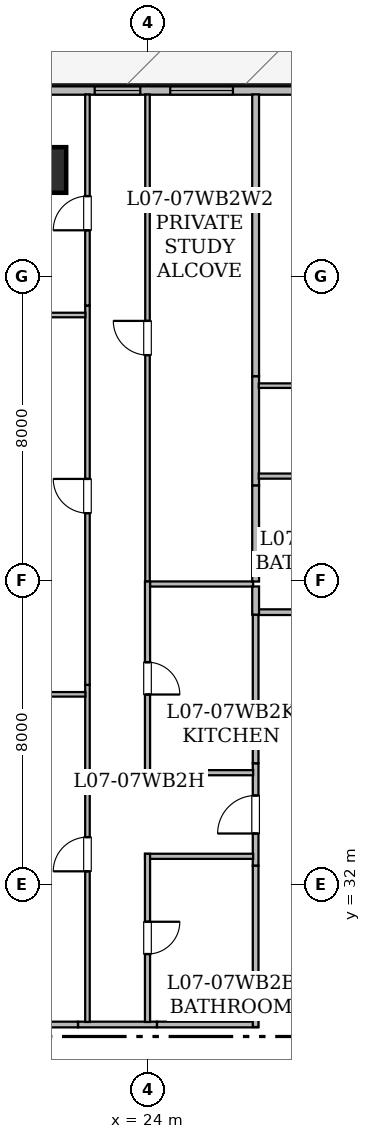
"""IFC4 building model, lengths in metres.
Left out: names, types, materials, properties, quantities, classifications, styles, units other than length and angle.
Written with IfcOpenShell. Run it as: python <this file> out.ifc"""

import sys

from ifc_helpers import new_model, si_unit, direction, frame, frame_2d, origin, origin_2d, place, context, subcontext, project, spatial, rectangle, hollow_rectangle, extrude, element, fill, save


model = new_model("IFC4")
c1 = context("Model", 3, precision=1e-05, world=origin(), true_north=direction((0.0, 1.0)))
c2 = subcontext(c1, "Body", "Model", "MODEL_VIEW")
j1 = project(units=[si_unit("LENGTHUNIT", "METRE"), si_unit("PLANEANGLEUNIT", "RADIAN")], contexts=[c1])
p1 = place(None, origin())
s1 = spatial("IfcSite", under=j1, at=p1, CompositionType="ELEMENT")
p2 = place(p1, origin())
s2 = spatial("IfcBuilding", under=s1, at=p2, CompositionType="ELEMENT")
p3 = place(p2, frame((0.0, 0.0, 33.3)))
s3 = spatial("IfcBuildingStorey", under=s2, at=p3, CompositionType="ELEMENT", Elevation=33.3)
p4 = place(p3, frame((21.25, 50.8, 0.025), z_axis=(0.0, 0.0, 1.0), x_axis=(1.0, 0.0, 0.0)))
e1 = element("IfcColumn", 1, at=p4, inside=s3, PredefinedType="COLUMN", context=c2, shape_type="SweptSolid", body=[
    extrude(hollow_rectangle(XDim=1.2, YDim=1.2, WallThickness=0.06, at=origin_2d()), origin(), (0.0, 0.0, 1.0), 3.625),
])
p5 = place(p3, frame((8.315, 52.89, 0.0), z_axis=(0.0, 0.0, 1.0), x_axis=(1.0, 0.0, 0.0)))
e2 = element("IfcWall", 2, at=p5, inside=s3, PredefinedType="STANDARD", context=c2, shape_type="SweptSolid", body=[
    extrude(rectangle(XDim=37.439, YDim=0.22, at=frame_2d((18.719, 0.0))), origin(), (0.0, 0.0, 1.0), 3.43),
])
p6 = place(p5, frame((19.779, 0.0, 0.0)))
e3 = element("IfcOpeningElement", 3, at=p6, cuts=e2, PredefinedType="OPENING", context=c2, shape_type="SweptSolid", body=[
    extrude(rectangle(XDim=1.0, YDim=2.15, at=frame_2d((0.5, 1.075))), frame((0.0, 0.12, 0.0), z_axis=(0.0, -1.0, 0.0), x_axis=(1.0, 0.0, 0.0)), (0.0, 0.0, 1.0), 0.24),
])
p7 = place(p5, frame((4.524, 0.0, 0.85)))
e4 = element("IfcOpeningElement", 4, at=p7, cuts=e2, PredefinedType="OPENING", context=c2, shape_type="SweptSolid", body=[
    extrude(rectangle(XDim=1.65, YDim=1.55, at=frame_2d((0.825, 0.775))), frame((0.0, 0.12, 0.0), z_axis=(0.0, -1.0, 0.0), x_axis=(1.0, 0.0, 0.0)), (0.0, 0.0, 1.0), 0.24),
])
p8 = place(p5, frame((16.273, 0.0, 0.85)))
e5 = element("IfcOpeningElement", 5, at=p8, cuts=e2, PredefinedType="OPENING", context=c2, shape_type="SweptSolid", body=[
    extrude(rectangle(XDim=1.65, YDim=1.55, at=frame_2d((0.825, 0.775))), frame((0.0, 0.12, 0.0), z_axis=(0.0, -1.0, 0.0), x_axis=(1.0, 0.0, 0.0)), (0.0, 0.0, 1.0), 0.24),
])
p9 = place(p5, frame((14.285, 0.0, 0.8)))
e6 = element("IfcOpeningElement", 6, at=p9, cuts=e2, PredefinedType="OPENING", context=c2, shape_type="SweptSolid", body=[
    extrude(rectangle(XDim=1.2, YDim=1.5, at=frame_2d((0.6, 0.75))), frame((0.0, 0.12, 0.0), z_axis=(0.0, -1.0, 0.0), x_axis=(1.0, 0.0, 0.0)), (0.0, 0.0, 1.0), 0.24),
])
p10 = place(p5, frame((10.238, 0.0, 0.85)))
e7 = element("IfcOpeningElement", 7, at=p10, cuts=e2, PredefinedType="OPENING", context=c2, shape_type="SweptSolid", body=[
    extrude(rectangle(XDim=1.65, YDim=1.55, at=frame_2d((0.825, 0.775))), frame((0.0, 0.12, 0.0), z_axis=(0.0, -1.0, 0.0), x_axis=(1.0, 0.0, 0.0)), (0.0, 0.0, 1.0), 0.24),
])
p11 = place(p5, frame((25.185, 0.0, 0.8)))
e8 = element("IfcOpeningElement", 8, at=p11, cuts=e2, PredefinedType="OPENING", context=c2, shape_type="SweptSolid", body=[
    extrude(rectangle(XDim=1.2, YDim=1.5, at=frame_2d((0.6, 0.75))), frame((0.0, 0.12, 0.0), z_axis=(0.0, -1.0, 0.0), x_axis=(1.0, 0.0, 0.0)), (0.0, 0.0, 1.0), 0.24),
])
p12 = place(p5, frame((28.985, 0.0, 0.85)))
e9 = element("IfcOpeningElement", 9, at=p12, cuts=e2, PredefinedType="OPENING", context=c2, shape_type="SweptSolid", body=[
    extrude(rectangle(XDim=1.65, YDim=1.55, at=frame_2d((0.825, 0.775))), frame((0.0, 0.12, 0.0), z_axis=(0.0, -1.0, 0.0), x_axis=(1.0, 0.0, 0.0)), (0.0, 0.0, 1.0), 0.24),
])
p13 = place(p5, frame((33.49, 0.0, 0.85)))
e10 = element("IfcOpeningElement", 10, at=p13, cuts=e2, PredefinedType="OPENING", context=c2, shape_type="SweptSolid", body=[
    extrude(rectangle(XDim=1.65, YDim=1.55, at=frame_2d((0.825, 0.775))), frame((0.0, 0.12, 0.0), z_axis=(0.0, -1.0, 0.0), x_axis=(1.0, 0.0, 0.0)), (0.0, 0.0, 1.0), 0.24),
])
p14 = place(p5, frame((35.942, 0.0, 0.85)))
e11 = element("IfcOpeningElement", 11, at=p14, cuts=e2, PredefinedType="OPENING", context=c2, shape_type="SweptSolid", body=[
    extrude(rectangle(XDim=1.35, YDim=1.5, at=frame_2d((0.675, 0.75))), frame((0.0, 0.12, 0.0), z_axis=(0.0, -1.0, 0.0), x_axis=(1.0, 0.0, 0.0)), (0.0, 0.0, 1.0), 0.24),
])
p15 = place(p3, frame((22.161, 28.315, 0.0), z_axis=(0.0, 0.0, 1.0), x_axis=(1.0, 0.0, 0.0)))
e12 = element("IfcWall", 12, at=p15, inside=s3, PredefinedType="STANDARD", context=c2, shape_type="SweptSolid", body=[
    extrude(rectangle(XDim=2.079, YDim=0.15, at=frame_2d((1.04, 0.0))), origin(), (0.0, 0.0, 1.0), 3.43),
])
p16 = place(p3, frame((26.835, 32.492, 0.0), z_axis=(0.0, 0.0, 1.0), x_axis=(0.0, 1.0, 0.0)))
e13 = element("IfcWall", 13, at=p16, inside=s3, PredefinedType="STANDARD", context=c2, shape_type="SweptSolid", body=[
    extrude(rectangle(XDim=2.698, YDim=0.15, at=frame_2d((1.349, 0.0))), origin(), (0.0, 0.0, 1.0), 3.43),
])
p17 = place(p16, frame((0.849, 0.0, 0.0)))
e14 = element("IfcOpeningElement", 14, at=p17, cuts=e13, PredefinedType="OPENING", context=c2, shape_type="SweptSolid", body=[
    extrude(rectangle(XDim=1.0, YDim=2.15, at=frame_2d((0.5, 1.075))), frame((0.0, 0.085, 0.0), z_axis=(0.0, -1.0, 0.0), x_axis=(1.0, 0.0, 0.0)), (0.0, 0.0, 1.0), 0.17),
])
p18 = place(p3, frame((24.24, 28.315, 0.0), z_axis=(0.0, 0.0, 1.0), x_axis=(1.0, 0.0, 0.0)))
e15 = element("IfcWall", 15, at=p18, inside=s3, PredefinedType="STANDARD", context=c2, shape_type="SweptSolid", body=[
    extrude(rectangle(XDim=2.66, YDim=0.15, at=frame_2d((1.33, 0.0))), origin(), (0.0, 0.0, 1.0), 3.43),
])
p19 = place(p3, frame((26.835, 28.25, 0.0), z_axis=(0.0, 0.0, 1.0), x_axis=(0.0, 1.0, 0.0)))
e16 = element("IfcWall", 16, at=p19, inside=s3, PredefinedType="STANDARD", context=c2, shape_type="SweptSolid", body=[
    extrude(rectangle(XDim=4.242, YDim=0.15, at=frame_2d((2.121, 0.0))), origin(), (0.0, 0.0, 1.0), 3.43),
])
p20 = place(p3, frame((26.835, 35.19, 0.0), z_axis=(0.0, 0.0, 1.0), x_axis=(0.0, 1.0, 0.0)))
e17 = element("IfcWall", 17, at=p20, inside=s3, PredefinedType="STANDARD", context=c2, shape_type="SweptSolid", body=[
    extrude(rectangle(XDim=3.91, YDim=0.15, at=frame_2d((1.955, 0.0))), origin(), (0.0, 0.0, 1.0), 2.647),
])
p21 = place(p3, frame((16.596, 28.315, 0.0), z_axis=(0.0, 0.0, 1.0), x_axis=(1.0, 0.0, 0.0)))
e18 = element("IfcWall", 18, at=p21, inside=s3, PredefinedType="STANDARD", context=c2, shape_type="SweptSolid", body=[
    extrude(rectangle(XDim=5.565, YDim=0.15, at=frame_2d((2.782, 0.0))), origin(), (0.0, 0.0, 1.0), 2.647),
])
p22 = place(p3, frame((26.9, 39.165, 0.0), z_axis=(0.0, 0.0, 1.0), x_axis=(1.0, 0.0, 0.0)))
e19 = element("IfcWall", 19, at=p22, inside=s3, PredefinedType="STANDARD", context=c2, shape_type="SweptSolid", body=[
    extrude(rectangle(XDim=4.701, YDim=0.15, at=frame_2d((2.351, 0.0))), origin(), (0.0, 0.0, 1.0), 2.647),
])
p23 = place(p3, frame((23.99, 39.971, 0.0), z_axis=(0.0, 0.0, 1.0), x_axis=(0.0, 1.0, 0.0)))
e20 = element("IfcWall", 20, at=p23, inside=s3, PredefinedType="PARTITIONING", context=c2, shape_type="SweptSolid", body=[
    extrude(rectangle(XDim=12.817, YDim=0.12, at=frame_2d((6.409, 0.0))), origin(), (0.0, 0.0, 1.0), 2.803),
])
p24 = place(p23, frame((5.958, 0.0, 0.0)))
e21 = element("IfcOpeningElement", 21, at=p24, cuts=e20, PredefinedType="OPENING", context=c2, shape_type="SweptSolid", body=[
    extrude(rectangle(XDim=0.9, YDim=2.1, at=frame_2d((0.45, 1.05))), frame((0.0, 0.07, 0.0), z_axis=(0.0, -1.0, 0.0), x_axis=(1.0, 0.0, 0.0)), (0.0, 0.0, 1.0), 0.14),
])
p25 = place(p3, frame((26.77, 39.906, 0.0), z_axis=(0.0, 0.0, 1.0), x_axis=(-1.0, 0.0, 0.0)))
e22 = element("IfcWall", 22, at=p25, inside=s3, PredefinedType="PARTITIONING", context=c2, shape_type="SweptSolid", body=[
    extrude(rectangle(XDim=2.715, YDim=0.135, at=frame_2d((1.357, 0.0))), origin(), (0.0, 0.0, 1.0), 3.43),
])
p26 = place(p3, frame((26.835, 45.374, 0.0), z_axis=(0.0, 0.0, 1.0), x_axis=(0.0, -1.0, 0.0)))
e23 = element("IfcWall", 23, at=p26, inside=s3, PredefinedType="STANDARD", context=c2, shape_type="SweptSolid", body=[
    extrude(rectangle(XDim=2.878, YDim=0.18, at=frame_2d((1.439, 0.0))), origin(), (0.0, 0.0, 1.0), 2.957),
])
p27 = place(p3, frame((26.835, 42.496, 0.0), z_axis=(0.0, 0.0, 1.0), x_axis=(0.0, -1.0, 0.0)))
e24 = element("IfcWall", 24, at=p27, inside=s3, PredefinedType="STANDARD", context=c2, shape_type="SweptSolid", body=[
    extrude(rectangle(XDim=2.525, YDim=0.18, at=frame_2d((1.263, 0.0))), origin(), (0.0, 0.0, 1.0), 2.957),
])
p28 = place(p3, frame((26.835, 52.788, 0.0), z_axis=(0.0, 0.0, 1.0), x_axis=(0.0, -1.0, 0.0)))
e25 = element("IfcWall", 25, at=p28, inside=s3, PredefinedType="STANDARD", context=c2, shape_type="SweptSolid", body=[
    extrude(rectangle(XDim=7.414, YDim=0.18, at=frame_2d((3.707, 0.0))), origin(), (0.0, 0.0, 1.0), 2.803),
])
p29 = place(p3, frame((26.77, 32.741, 0.0), z_axis=(0.0, 0.0, 1.0), x_axis=(-1.0, 0.0, 0.0)))
e26 = element("IfcWall", 26, at=p29, inside=s3, PredefinedType="PARTITIONING", context=c2, shape_type="SweptSolid", body=[
    extrude(rectangle(XDim=2.845, YDim=0.135, at=frame_2d((1.422, 0.0))), origin(), (0.0, 0.0, 1.0), 3.43),
])
p30 = place(p3, frame((23.99, 32.806, 0.0), z_axis=(0.0, 0.0, 1.0), x_axis=(0.0, -1.0, 0.0)))
e27 = element("IfcWall", 27, at=p30, inside=s3, PredefinedType="PARTITIONING", context=c2, shape_type="SweptSolid", body=[
    extrude(rectangle(XDim=4.424, YDim=0.135, at=frame_2d((2.212, 0.0))), origin(), (0.0, 0.0, 1.0), 3.43),
])
p31 = place(p30, frame((1.787, 0.0, 0.0)))
e28 = element("IfcOpeningElement", 28, at=p31, cuts=e27, PredefinedType="OPENING", context=c2, shape_type="SweptSolid", body=[
    extrude(rectangle(XDim=0.85, YDim=2.1, at=frame_2d((0.425, 1.05))), frame((0.0, 0.077, 0.0), z_axis=(0.0, -1.0, 0.0), x_axis=(1.0, 0.0, 0.0)), (0.0, 0.0, 1.0), 0.155),
])
p32 = place(p3, frame((23.99, 39.971, 0.0), z_axis=(0.0, 0.0, 1.0), x_axis=(0.0, -1.0, 0.0)))
e29 = element("IfcWall", 29, at=p32, inside=s3, PredefinedType="PARTITIONING", context=c2, shape_type="SweptSolid", body=[
    extrude(rectangle(XDim=5.095, YDim=0.135, at=frame_2d((2.547, 0.0))), origin(), (0.0, 0.0, 1.0), 2.647),
])
p33 = place(p32, frame((2.123, 0.0, 0.0)))
e30 = element("IfcOpeningElement", 30, at=p33, cuts=e29, PredefinedType="OPENING", context=c2, shape_type="SweptSolid", body=[
    extrude(rectangle(XDim=0.85, YDim=2.1, at=frame_2d((0.425, 1.05))), frame((0.0, 0.077, 0.0), z_axis=(0.0, -1.0, 0.0), x_axis=(1.0, 0.0, 0.0)), (0.0, 0.0, 1.0), 0.155),
])
p34 = place(p3, frame((23.925, 34.941, 0.0), z_axis=(0.0, 0.0, 1.0), x_axis=(1.0, 0.0, 0.0)))
e31 = element("IfcWall", 31, at=p34, inside=s3, PredefinedType="PARTITIONING", context=c2, shape_type="SweptSolid", body=[
    extrude(rectangle(XDim=2.845, YDim=0.135, at=frame_2d((1.422, 0.0))), origin(), (0.0, 0.0, 1.0), 3.43),
])
p35 = place(p3, frame((22.41, 28.382, 0.0), z_axis=(0.0, 0.0, 1.0), x_axis=(0.0, 1.0, 0.0)))
e32 = element("IfcWall", 32, at=p35, inside=s3, PredefinedType="PARTITIONING", context=c2, shape_type="SweptSolid", body=[
    extrude(rectangle(XDim=8.87, YDim=0.12, at=frame_2d((4.435, 0.0))), origin(), (0.0, 0.0, 1.0), 3.43),
])
p36 = place(p35, frame((3.964, 0.0, 0.0)))
e33 = element("IfcOpeningElement", 33, at=p36, cuts=e32, PredefinedType="OPENING", context=c2, shape_type="SweptSolid", body=[
    extrude(rectangle(XDim=0.9, YDim=2.1, at=frame_2d((0.45, 1.05))), frame((0.0, 0.07, 0.0), z_axis=(0.0, -1.0, 0.0), x_axis=(1.0, 0.0, 0.0)), (0.0, 0.0, 1.0), 0.14),
])
p37 = place(p3, frame((22.41, 37.252, 0.0), z_axis=(0.0, 0.0, 1.0), x_axis=(0.0, 1.0, 0.0)))
e34 = element("IfcWall", 34, at=p37, inside=s3, PredefinedType="PARTITIONING", context=c2, shape_type="SweptSolid", body=[
    extrude(rectangle(XDim=9.981, YDim=0.12, at=frame_2d((4.99, 0.0))), origin(), (0.0, 0.0, 1.0), 2.647),
])
p38 = place(p37, frame((4.519, 0.0, 0.0)))
e35 = element("IfcOpeningElement", 35, at=p38, cuts=e34, PredefinedType="OPENING", context=c2, shape_type="SweptSolid", body=[
    extrude(rectangle(XDim=0.9, YDim=2.1, at=frame_2d((0.45, 1.05))), frame((0.0, 0.07, 0.0), z_axis=(0.0, -1.0, 0.0), x_axis=(1.0, 0.0, 0.0)), (0.0, 0.0, 1.0), 0.14),
])
p39 = place(p3, frame((22.41, 47.233, 0.0), z_axis=(0.0, 0.0, 1.0), x_axis=(0.0, 1.0, 0.0)))
e36 = element("IfcWall", 36, at=p39, inside=s3, PredefinedType="PARTITIONING", context=c2, shape_type="SweptSolid", body=[
    extrude(rectangle(XDim=5.555, YDim=0.12, at=frame_2d((2.778, 0.0))), origin(), (0.0, 0.0, 1.0), 2.803),
])
p40 = place(p39, frame((1.98, 0.0, 0.0)))
e37 = element("IfcOpeningElement", 37, at=p40, cuts=e36, PredefinedType="OPENING", context=c2, shape_type="SweptSolid", body=[
    extrude(rectangle(XDim=0.9, YDim=2.1, at=frame_2d((0.45, 1.05))), frame((0.0, 0.07, 0.0), z_axis=(0.0, -1.0, 0.0), x_axis=(1.0, 0.0, 0.0)), (0.0, 0.0, 1.0), 0.14),
])
p41 = place(p3, frame((26.835, 39.841, 0.0), z_axis=(0.0, 0.0, 1.0), x_axis=(0.0, -1.0, 0.0)))
e38 = element("IfcWall", 38, at=p41, inside=s3, PredefinedType="STANDARD", context=c2, shape_type="SweptSolid", body=[
    extrude(rectangle(XDim=0.741, YDim=0.18, at=frame_2d((0.371, 0.0))), origin(), (0.0, 0.0, 1.0), 3.43),
])
p42 = place(p3, frame((16.428, 37.003, 0.0), z_axis=(0.0, 0.0, 1.0), x_axis=(1.0, 0.0, 0.0)))
e39 = element("IfcWall", 39, at=p42, inside=s3, PredefinedType="PARTITIONING", context=c2, shape_type="SweptSolid", body=[
    extrude(rectangle(XDim=5.928, YDim=0.12, at=frame_2d((2.964, 0.0))), origin(), (0.0, 0.0, 1.0), 2.647),
])
p43 = place(p42, frame((2.514, 0.0, 0.0)))
e40 = element("IfcOpeningElement", 40, at=p43, cuts=e39, PredefinedType="OPENING", context=c2, shape_type="SweptSolid", body=[
    extrude(rectangle(XDim=0.9, YDim=2.1, at=frame_2d((0.45, 1.05))), frame((0.0, 0.07, 0.0), z_axis=(0.0, -1.0, 0.0), x_axis=(1.0, 0.0, 0.0)), (0.0, 0.0, 1.0), 0.14),
])
p44 = place(p3, frame((16.428, 46.984, 0.0), z_axis=(0.0, 0.0, 1.0), x_axis=(1.0, 0.0, 0.0)))
e41 = element("IfcWall", 41, at=p44, inside=s3, PredefinedType="PARTITIONING", context=c2, shape_type="SweptSolid", body=[
    extrude(rectangle(XDim=5.928, YDim=0.12, at=frame_2d((2.964, 0.0))), origin(), (0.0, 0.0, 1.0), 2.647),
])
p45 = place(p44, frame((2.514, 0.0, 0.0)))
e42 = element("IfcOpeningElement", 42, at=p45, cuts=e41, PredefinedType="OPENING", context=c2, shape_type="SweptSolid", body=[
    extrude(rectangle(XDim=0.9, YDim=2.1, at=frame_2d((0.45, 1.05))), frame((0.0, 0.07, 0.0), z_axis=(0.0, -1.0, 0.0), x_axis=(1.0, 0.0, 0.0)), (0.0, 0.0, 1.0), 0.14),
])
p46 = place(p3, frame((31.915, 42.745, 0.0), z_axis=(0.0, 0.0, 1.0), x_axis=(-1.0, 0.0, 0.0)))
e43 = element("IfcWall", 43, at=p46, inside=s3, PredefinedType="PARTITIONING", context=c2, shape_type="SweptSolid", body=[
    extrude(rectangle(XDim=4.998, YDim=0.135, at=frame_2d((2.499, 0.0))), origin(), (0.0, 0.0, 1.0), 2.647),
])
p47 = place(p46, frame((2.074, 0.0, 0.0)))
e44 = element("IfcOpeningElement", 44, at=p47, cuts=e43, PredefinedType="OPENING", context=c2, shape_type="SweptSolid", body=[
    extrude(rectangle(XDim=0.85, YDim=2.1, at=frame_2d((0.425, 1.05))), frame((0.0, 0.077, 0.0), z_axis=(0.0, -1.0, 0.0), x_axis=(1.0, 0.0, 0.0)), (0.0, 0.0, 1.0), 0.155),
])
p48 = place(p3, frame((26.917, 45.125, 0.0), z_axis=(0.0, 0.0, 1.0), x_axis=(1.0, 0.0, 0.0)))
e45 = element("IfcWall", 45, at=p48, inside=s3, PredefinedType="PARTITIONING", context=c2, shape_type="SweptSolid", body=[
    extrude(rectangle(XDim=6.463, YDim=0.12, at=frame_2d((3.231, 0.0))), origin(), (0.0, 0.0, 1.0), 2.647),
])
p49 = place(p8, origin())
e46 = element("IfcWindow", 46, at=p49, inside=s3, PartitioningType="SINGLE_PANEL", PredefinedType="WINDOW", context=c2, shape_type="SweptSolid", body=[
    extrude(rectangle(XDim=1.65, YDim=1.55, at=frame_2d((0.825, 0.775))), frame((0.0, 0.03, 0.0), z_axis=(0.0, -1.0, 0.0), x_axis=(1.0, 0.0, 0.0)), (0.0, 0.0, 1.0), 0.06),
])
fill(e5, e46)
p50 = place(p9, origin())
e47 = element("IfcWindow", 47, at=p50, inside=s3, PartitioningType="SINGLE_PANEL", PredefinedType="WINDOW", context=c2, shape_type="SweptSolid", body=[
    extrude(rectangle(XDim=1.2, YDim=1.5, at=frame_2d((0.6, 0.75))), frame((0.0, 0.03, 0.0), z_axis=(0.0, -1.0, 0.0), x_axis=(1.0, 0.0, 0.0)), (0.0, 0.0, 1.0), 0.06),
])
fill(e6, e47)
p51 = place(p17, origin())
e48 = element("IfcDoor", 48, at=p51, inside=s3, OperationType="SINGLE_SWING_LEFT", PredefinedType="DOOR", context=c2, shape_type="SweptSolid", body=[
    extrude(rectangle(XDim=1.0, YDim=2.15, at=frame_2d((0.5, 1.075))), frame((0.0, 0.025, 0.0), z_axis=(0.0, -1.0, 0.0), x_axis=(1.0, 0.0, 0.0)), (0.0, 0.0, 1.0), 0.05),
])
fill(e14, e48)
p52 = place(p24, origin())
e49 = element("IfcDoor", 49, at=p52, inside=s3, OperationType="SINGLE_SWING_RIGHT", PredefinedType="DOOR", context=c2, shape_type="SweptSolid", body=[
    extrude(rectangle(XDim=0.9, YDim=2.1, at=frame_2d((0.45, 1.05))), frame((0.0, 0.025, 0.0), z_axis=(0.0, -1.0, 0.0), x_axis=(1.0, 0.0, 0.0)), (0.0, 0.0, 1.0), 0.05),
])
fill(e21, e49)
p53 = place(p31, origin())
e50 = element("IfcDoor", 50, at=p53, inside=s3, OperationType="SINGLE_SWING_LEFT", PredefinedType="DOOR", context=c2, shape_type="SweptSolid", body=[
    extrude(rectangle(XDim=0.85, YDim=2.1, at=frame_2d((0.425, 1.05))), frame((0.0, 0.025, 0.0), z_axis=(0.0, -1.0, 0.0), x_axis=(1.0, 0.0, 0.0)), (0.0, 0.0, 1.0), 0.05),
])
fill(e28, e50)
p54 = place(p33, origin())
e51 = element("IfcDoor", 51, at=p54, inside=s3, OperationType="SINGLE_SWING_RIGHT", PredefinedType="DOOR", context=c2, shape_type="SweptSolid", body=[
    extrude(rectangle(XDim=0.85, YDim=2.1, at=frame_2d((0.425, 1.05))), frame((0.0, 0.025, 0.0), z_axis=(0.0, -1.0, 0.0), x_axis=(1.0, 0.0, 0.0)), (0.0, 0.0, 1.0), 0.05),
])
fill(e30, e51)
p55 = place(p36, origin())
e52 = element("IfcDoor", 52, at=p55, inside=s3, OperationType="SINGLE_SWING_LEFT", PredefinedType="DOOR", context=c2, shape_type="SweptSolid", body=[
    extrude(rectangle(XDim=0.9, YDim=2.1, at=frame_2d((0.45, 1.05))), frame((0.0, 0.025, 0.0), z_axis=(0.0, -1.0, 0.0), x_axis=(1.0, 0.0, 0.0)), (0.0, 0.0, 1.0), 0.05),
])
fill(e33, e52)
p56 = place(p38, origin())
e53 = element("IfcDoor", 53, at=p56, inside=s3, OperationType="SINGLE_SWING_RIGHT", PredefinedType="DOOR", context=c2, shape_type="SweptSolid", body=[
    extrude(rectangle(XDim=0.9, YDim=2.1, at=frame_2d((0.45, 1.05))), frame((0.0, 0.025, 0.0), z_axis=(0.0, -1.0, 0.0), x_axis=(1.0, 0.0, 0.0)), (0.0, 0.0, 1.0), 0.05),
])
fill(e35, e53)
p57 = place(p40, origin())
e54 = element("IfcDoor", 54, at=p57, inside=s3, OperationType="SINGLE_SWING_LEFT", PredefinedType="DOOR", context=c2, shape_type="SweptSolid", body=[
    extrude(rectangle(XDim=0.9, YDim=2.1, at=frame_2d((0.45, 1.05))), frame((0.0, 0.025, 0.0), z_axis=(0.0, -1.0, 0.0), x_axis=(1.0, 0.0, 0.0)), (0.0, 0.0, 1.0), 0.05),
])
fill(e37, e54)
save(model, sys.argv[1])
